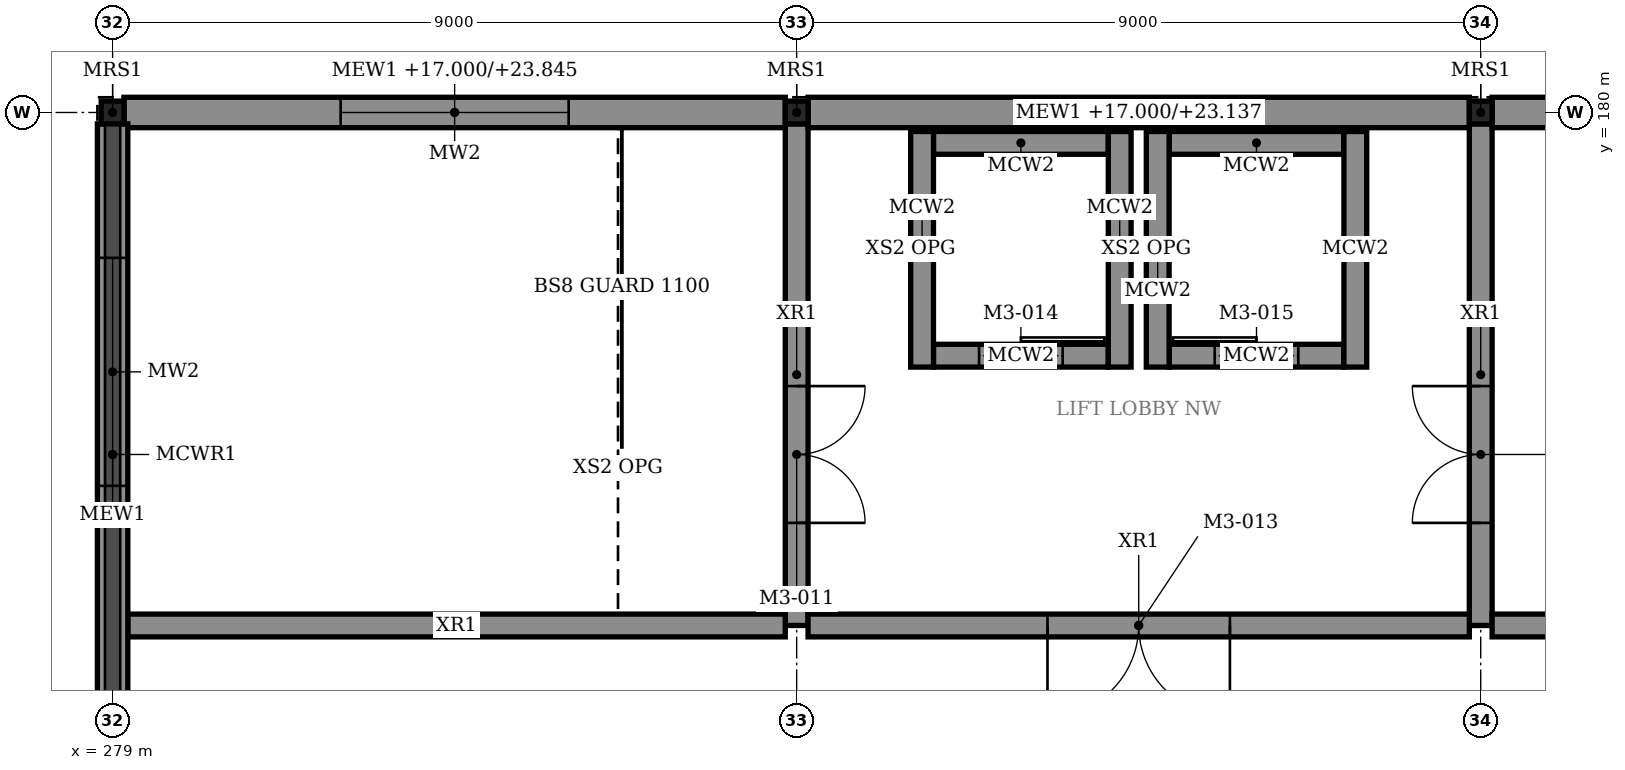
"""IFC4 building model, lengths in metres.
Left out: names, types, materials, properties, quantities, classifications, styles, units other than length and angle.
Written with IfcOpenShell. Run it as: python <this file> out.ifc"""

import sys

from ifc_helpers import new_model, si_unit, direction, frame, frame_2d, origin, origin_2d, place, context, subcontext, project, spatial, polyline, rectangle, hollow_rectangle, outline, extrude, element, fill, save


model = new_model("IFC4")
c1 = context("Model", 3, precision=1e-05, world=origin(), true_north=direction((0.0, 1.0)))
c2 = subcontext(c1, "Body", "Model", "MODEL_VIEW")
j1 = project(units=[si_unit("LENGTHUNIT", "METRE"), si_unit("PLANEANGLEUNIT", "RADIAN")], contexts=[c1])
p1 = place(None, origin())
s1 = spatial("IfcSite", under=j1, at=p1, CompositionType="ELEMENT")
p2 = place(p1, origin())
s2 = spatial("IfcBuilding", under=s1, at=p2, CompositionType="ELEMENT")
p3 = place(p2, frame((0.0, 0.0, 17.0)))
s3 = spatial("IfcBuildingStorey", under=s2, at=p3, CompositionType="ELEMENT", Elevation=17.0)
for number, where, z_axis, x_axis in (
    (1, (279.0, 180.0, 0.0), (0.0, 0.0, 1.0), (1.0, 0.0, 0.0)),
    (2, (288.0, 180.0, 0.0), (0.0, 0.0, 1.0), (1.0, 0.0, 0.0)),
    (3, (297.0, 180.0, 0.0), (0.0, 0.0, 1.0), (1.0, 0.0, 0.0)),
):
    element("IfcColumn", number, at=place(p3, frame(where, z_axis=z_axis, x_axis=x_axis)), inside=s3, PredefinedType="COLUMN", context=c2, shape_type="SweptSolid", body=[
        extrude(hollow_rectangle(XDim=0.3, YDim=0.3, WallThickness=0.012, InnerFilletRadius=0.024, OuterFilletRadius=0.036, at=origin_2d()), origin(), (0.0, 0.0, 1.0), 3.1),
    ])
p4 = place(p3, frame((279.15, 180.0, 0.0), z_axis=(0.0, 0.0, 1.0), x_axis=(1.0, 0.0, 0.0)))
e4 = element("IfcWall", 4, at=p4, inside=s3, PredefinedType="STANDARD", context=c2, shape_type="SweptSolid", body=[
    extrude(outline(polyline([(0.0, 0.0), (8.7, 0.0), (8.7, 6.845), (0.0, 7.53), (0.0, 0.0)])), frame((0.0, 0.2, 0.0), z_axis=(0.0, -1.0, 0.0), x_axis=(1.0, 0.0, 0.0)), (0.0, 0.0, 1.0), 0.4),
])
p5 = place(p4, frame((2.85, 0.0, 0.9)))
e5 = element("IfcOpeningElement", 5, at=p5, cuts=e4, PredefinedType="OPENING", context=c2, shape_type="SweptSolid", body=[
    extrude(rectangle(XDim=3.0, YDim=2.1, at=frame_2d((1.5, 1.05))), frame((0.0, 0.21, 0.0), z_axis=(0.0, -1.0, 0.0), x_axis=(1.0, 0.0, 0.0)), (0.0, 0.0, 1.0), 0.42),
])
p6 = place(p3, frame((288.15, 180.0, 0.0), z_axis=(0.0, 0.0, 1.0), x_axis=(1.0, 0.0, 0.0)))
e6 = element("IfcWall", 6, at=p6, inside=s3, PredefinedType="STANDARD", context=c2, shape_type="SweptSolid", body=[
    extrude(outline(polyline([(0.0, 0.0), (8.7, 0.0), (8.7, 6.137), (0.0, 6.822), (0.0, 0.0)])), frame((0.0, 0.2, 0.0), z_axis=(0.0, -1.0, 0.0), x_axis=(1.0, 0.0, 0.0)), (0.0, 0.0, 1.0), 0.4),
])
p7 = place(p3, frame((297.15, 180.0, 0.0), z_axis=(0.0, 0.0, 1.0), x_axis=(1.0, 0.0, 0.0)))
e7 = element("IfcWall", 7, at=p7, inside=s3, PredefinedType="STANDARD", context=c2, shape_type="SweptSolid", body=[
    extrude(outline(polyline([(0.0, 0.0), (8.7, 0.0), (8.7, 5.428), (0.0, 6.113), (0.0, 0.0)])), frame((0.0, 0.2, 0.0), z_axis=(0.0, -1.0, 0.0), x_axis=(1.0, 0.0, 0.0)), (0.0, 0.0, 1.0), 0.4),
])
p8 = place(p7, frame((2.85, 0.0, 0.9)))
e8 = element("IfcOpeningElement", 8, at=p8, cuts=e7, PredefinedType="OPENING", context=c2, shape_type="SweptSolid", body=[
    extrude(rectangle(XDim=3.0, YDim=2.1, at=frame_2d((1.5, 1.05))), frame((0.0, 0.21, 0.0), z_axis=(0.0, -1.0, 0.0), x_axis=(1.0, 0.0, 0.0)), (0.0, 0.0, 1.0), 0.42),
])
p9 = place(p3, frame((279.0, 171.15, 0.0), z_axis=(0.0, 0.0, 1.0), x_axis=(0.0, 1.0, 0.0)))
e9 = element("IfcWall", 9, at=p9, inside=s3, PredefinedType="STANDARD", context=c2, shape_type="SweptSolid", body=[
    extrude(rectangle(XDim=8.7, YDim=0.4, at=frame_2d((4.35, 0.0))), origin(), (0.0, 0.0, 1.0), 3.3),
])
p10 = place(p9, frame((3.938, 0.0, 0.9)))
e10 = element("IfcOpeningElement", 10, at=p10, cuts=e9, PredefinedType="OPENING", context=c2, shape_type="SweptSolid", body=[
    extrude(rectangle(XDim=3.0, YDim=2.1, at=frame_2d((1.5, 1.05))), frame((0.0, 0.21, 0.0), z_axis=(0.0, -1.0, 0.0), x_axis=(1.0, 0.0, 0.0)), (0.0, 0.0, 1.0), 0.42),
])
p11 = place(p3, frame((288.0, 173.25, 0.0), z_axis=(0.0, 0.0, 1.0), x_axis=(0.0, 1.0, 0.0)))
e11 = element("IfcWall", 11, at=p11, inside=s3, PredefinedType="SHEAR", context=c2, shape_type="SweptSolid", body=[
    extrude(rectangle(XDim=6.6, YDim=0.3, at=frame_2d((3.3, 0.0))), origin(), (0.0, 0.0, 1.0), 3.0),
])
p12 = place(p11, frame((1.35, 0.0, 0.0)))
e12 = element("IfcOpeningElement", 12, at=p12, cuts=e11, PredefinedType="OPENING", context=c2, shape_type="SweptSolid", body=[
    extrude(rectangle(XDim=1.8, YDim=2.4, at=frame_2d((0.9, 1.2))), frame((0.0, 0.16, 0.0), z_axis=(0.0, -1.0, 0.0), x_axis=(1.0, 0.0, 0.0)), (0.0, 0.0, 1.0), 0.32),
])
p13 = place(p3, frame((297.0, 173.25, 0.0), z_axis=(0.0, 0.0, 1.0), x_axis=(0.0, 1.0, 0.0)))
e13 = element("IfcWall", 13, at=p13, inside=s3, PredefinedType="SHEAR", context=c2, shape_type="SweptSolid", body=[
    extrude(rectangle(XDim=6.6, YDim=0.3, at=frame_2d((3.3, 0.0))), origin(), (0.0, 0.0, 1.0), 3.0),
])
p14 = place(p13, frame((1.35, 0.0, 0.0)))
e14 = element("IfcOpeningElement", 14, at=p14, cuts=e13, PredefinedType="OPENING", context=c2, shape_type="SweptSolid", body=[
    extrude(rectangle(XDim=1.8, YDim=2.4, at=frame_2d((0.9, 1.2))), frame((0.0, 0.16, 0.0), z_axis=(0.0, -1.0, 0.0), x_axis=(1.0, 0.0, 0.0)), (0.0, 0.0, 1.0), 0.32),
])
p15 = place(p3, frame((279.2, 173.25, 0.0), z_axis=(0.0, 0.0, 1.0), x_axis=(1.0, 0.0, 0.0)))
e15 = element("IfcWall", 15, at=p15, inside=s3, PredefinedType="SHEAR", context=c2, shape_type="SweptSolid", body=[
    extrude(rectangle(XDim=8.65, YDim=0.3, at=frame_2d((4.325, 0.0))), origin(), (0.0, 0.0, 1.0), 3.0),
])
p16 = place(p3, frame((288.15, 173.25, 0.0), z_axis=(0.0, 0.0, 1.0), x_axis=(1.0, 0.0, 0.0)))
e16 = element("IfcWall", 16, at=p16, inside=s3, PredefinedType="SHEAR", context=c2, shape_type="SweptSolid", body=[
    extrude(rectangle(XDim=8.7, YDim=0.3, at=frame_2d((4.35, 0.0))), origin(), (0.0, 0.0, 1.0), 3.0),
])
p17 = place(p16, frame((3.15, 0.0, 0.0)))
e17 = element("IfcOpeningElement", 17, at=p17, cuts=e16, PredefinedType="OPENING", context=c2, shape_type="SweptSolid", body=[
    extrude(rectangle(XDim=2.4, YDim=2.4, at=frame_2d((1.2, 1.2))), frame((0.0, 0.16, 0.0), z_axis=(0.0, -1.0, 0.0), x_axis=(1.0, 0.0, 0.0)), (0.0, 0.0, 1.0), 0.32),
])
p18 = place(p3, frame((297.15, 173.25, 0.0), z_axis=(0.0, 0.0, 1.0), x_axis=(1.0, 0.0, 0.0)))
e18 = element("IfcWall", 18, at=p18, inside=s3, PredefinedType="SHEAR", context=c2, shape_type="SweptSolid", body=[
    extrude(rectangle(XDim=8.7, YDim=0.3, at=frame_2d((4.35, 0.0))), origin(), (0.0, 0.0, 1.0), 3.0),
])
for number, where, z_axis, x_axis in (
    (19, (289.65, 176.65, 0.0), (0.0, 0.0, 1.0), (0.0, 1.0, 0.0)),
    (20, (292.25, 176.65, 0.0), (0.0, 0.0, 1.0), (0.0, 1.0, 0.0)),
):
    element("IfcWall", number, at=place(p3, frame(where, z_axis=z_axis, x_axis=x_axis)), inside=s3, PredefinedType="SHEAR", context=c2, shape_type="SweptSolid", body=[
        extrude(rectangle(XDim=3.1, YDim=0.3, at=frame_2d((1.55, 0.0))), origin(), (0.0, 0.0, 1.0), 3.0),
    ])
p19 = place(p3, frame((289.8, 179.6, 0.0), z_axis=(0.0, 0.0, 1.0), x_axis=(1.0, 0.0, 0.0)))
e21 = element("IfcWall", 21, at=p19, inside=s3, PredefinedType="SHEAR", context=c2, shape_type="SweptSolid", body=[
    extrude(rectangle(XDim=2.3, YDim=0.3, at=frame_2d((1.15, 0.0))), origin(), (0.0, 0.0, 1.0), 3.0),
])
p20 = place(p3, frame((289.8, 176.8, 0.0), z_axis=(0.0, 0.0, 1.0), x_axis=(1.0, 0.0, 0.0)))
e22 = element("IfcWall", 22, at=p20, inside=s3, PredefinedType="SHEAR", context=c2, shape_type="SweptSolid", body=[
    extrude(rectangle(XDim=2.3, YDim=0.3, at=frame_2d((1.15, 0.0))), origin(), (0.0, 0.0, 1.0), 3.0),
])
p21 = place(p20, frame((0.6, 0.0, 0.0)))
e23 = element("IfcOpeningElement", 23, at=p21, cuts=e22, PredefinedType="OPENING", context=c2, shape_type="SweptSolid", body=[
    extrude(rectangle(XDim=1.1, YDim=2.2, at=frame_2d((0.55, 1.1))), frame((0.0, 0.16, 0.0), z_axis=(0.0, -1.0, 0.0), x_axis=(1.0, 0.0, 0.0)), (0.0, 0.0, 1.0), 0.32),
])
for number, where, z_axis, x_axis in (
    (24, (292.75, 176.65, 0.0), (0.0, 0.0, 1.0), (0.0, 1.0, 0.0)),
    (25, (295.35, 176.65, 0.0), (0.0, 0.0, 1.0), (0.0, 1.0, 0.0)),
):
    element("IfcWall", number, at=place(p3, frame(where, z_axis=z_axis, x_axis=x_axis)), inside=s3, PredefinedType="SHEAR", context=c2, shape_type="SweptSolid", body=[
        extrude(rectangle(XDim=3.1, YDim=0.3, at=frame_2d((1.55, 0.0))), origin(), (0.0, 0.0, 1.0), 3.0),
    ])
p22 = place(p3, frame((292.9, 179.6, 0.0), z_axis=(0.0, 0.0, 1.0), x_axis=(1.0, 0.0, 0.0)))
e26 = element("IfcWall", 26, at=p22, inside=s3, PredefinedType="SHEAR", context=c2, shape_type="SweptSolid", body=[
    extrude(rectangle(XDim=2.3, YDim=0.3, at=frame_2d((1.15, 0.0))), origin(), (0.0, 0.0, 1.0), 3.0),
])
p23 = place(p3, frame((292.9, 176.8, 0.0), z_axis=(0.0, 0.0, 1.0), x_axis=(1.0, 0.0, 0.0)))
e27 = element("IfcWall", 27, at=p23, inside=s3, PredefinedType="SHEAR", context=c2, shape_type="SweptSolid", body=[
    extrude(rectangle(XDim=2.3, YDim=0.3, at=frame_2d((1.15, 0.0))), origin(), (0.0, 0.0, 1.0), 3.0),
])
p24 = place(p23, frame((0.6, 0.0, 0.0)))
e28 = element("IfcOpeningElement", 28, at=p24, cuts=e27, PredefinedType="OPENING", context=c2, shape_type="SweptSolid", body=[
    extrude(rectangle(XDim=1.1, YDim=2.2, at=frame_2d((0.55, 1.1))), frame((0.0, 0.16, 0.0), z_axis=(0.0, -1.0, 0.0), x_axis=(1.0, 0.0, 0.0)), (0.0, 0.0, 1.0), 0.32),
])
p25 = place(p5, origin())
e29 = element("IfcWindow", 29, at=p25, inside=s3, PartitioningType="TRIPLE_PANEL_VERTICAL", PredefinedType="WINDOW", context=c2, shape_type="SweptSolid", body=[
    extrude(rectangle(XDim=3.0, YDim=2.1, at=frame_2d((1.5, 1.05))), frame((0.0, 0.03, 0.0), z_axis=(0.0, -1.0, 0.0), x_axis=(1.0, 0.0, 0.0)), (0.0, 0.0, 1.0), 0.06),
])
fill(e5, e29)
p26 = place(p10, origin())
e30 = element("IfcWindow", 30, at=p26, inside=s3, PartitioningType="TRIPLE_PANEL_VERTICAL", PredefinedType="WINDOW", context=c2, shape_type="SweptSolid", body=[
    extrude(rectangle(XDim=3.0, YDim=2.1, at=frame_2d((1.5, 1.05))), frame((0.0, 0.03, 0.0), z_axis=(0.0, -1.0, 0.0), x_axis=(1.0, 0.0, 0.0)), (0.0, 0.0, 1.0), 0.06),
])
fill(e10, e30)
p27 = place(p12, frame((1.8, 0.0, 0.0), z_axis=(0.0, 0.0, 1.0), x_axis=(-1.0, 0.0, 0.0)))
e31 = element("IfcDoor", 31, at=p27, inside=s3, OperationType="DOUBLE_DOOR_SINGLE_SWING", PredefinedType="DOOR", context=c2, shape_type="SweptSolid", body=[
    extrude(rectangle(XDim=1.8, YDim=2.4, at=frame_2d((0.9, 1.2))), frame((0.0, 0.025, 0.0), z_axis=(0.0, -1.0, 0.0), x_axis=(1.0, 0.0, 0.0)), (0.0, 0.0, 1.0), 0.05),
])
fill(e12, e31)
p28 = place(p14, origin())
e32 = element("IfcDoor", 32, at=p28, inside=s3, OperationType="DOUBLE_DOOR_SINGLE_SWING", PredefinedType="DOOR", context=c2, shape_type="SweptSolid", body=[
    extrude(rectangle(XDim=1.8, YDim=2.4, at=frame_2d((0.9, 1.2))), frame((0.0, 0.025, 0.0), z_axis=(0.0, -1.0, 0.0), x_axis=(1.0, 0.0, 0.0)), (0.0, 0.0, 1.0), 0.05),
])
fill(e14, e32)
p29 = place(p17, frame((2.4, 0.0, 0.0), z_axis=(0.0, 0.0, 1.0), x_axis=(-1.0, 0.0, 0.0)))
e33 = element("IfcDoor", 33, at=p29, inside=s3, OperationType="DOUBLE_DOOR_SINGLE_SWING", PredefinedType="DOOR", context=c2, shape_type="SweptSolid", body=[
    extrude(rectangle(XDim=2.4, YDim=2.4, at=frame_2d((1.2, 1.2))), frame((0.0, 0.025, 0.0), z_axis=(0.0, -1.0, 0.0), x_axis=(1.0, 0.0, 0.0)), (0.0, 0.0, 1.0), 0.05),
])
fill(e17, e33)
p30 = place(p21, origin())
e34 = element("IfcDoor", 34, at=p30, inside=s3, OperationType="SLIDING_TO_RIGHT", PredefinedType="DOOR", context=c2, shape_type="SweptSolid", body=[
    extrude(rectangle(XDim=1.1, YDim=2.2, at=frame_2d((0.55, 1.1))), frame((0.0, 0.025, 0.0), z_axis=(0.0, -1.0, 0.0), x_axis=(1.0, 0.0, 0.0)), (0.0, 0.0, 1.0), 0.05),
])
fill(e23, e34)
p31 = place(p24, origin())
e35 = element("IfcDoor", 35, at=p31, inside=s3, OperationType="SLIDING_TO_LEFT", PredefinedType="DOOR", context=c2, shape_type="SweptSolid", body=[
    extrude(rectangle(XDim=1.1, YDim=2.2, at=frame_2d((0.55, 1.1))), frame((0.0, 0.025, 0.0), z_axis=(0.0, -1.0, 0.0), x_axis=(1.0, 0.0, 0.0)), (0.0, 0.0, 1.0), 0.05),
])
fill(e28, e35)
save(model, sys.argv[1])
